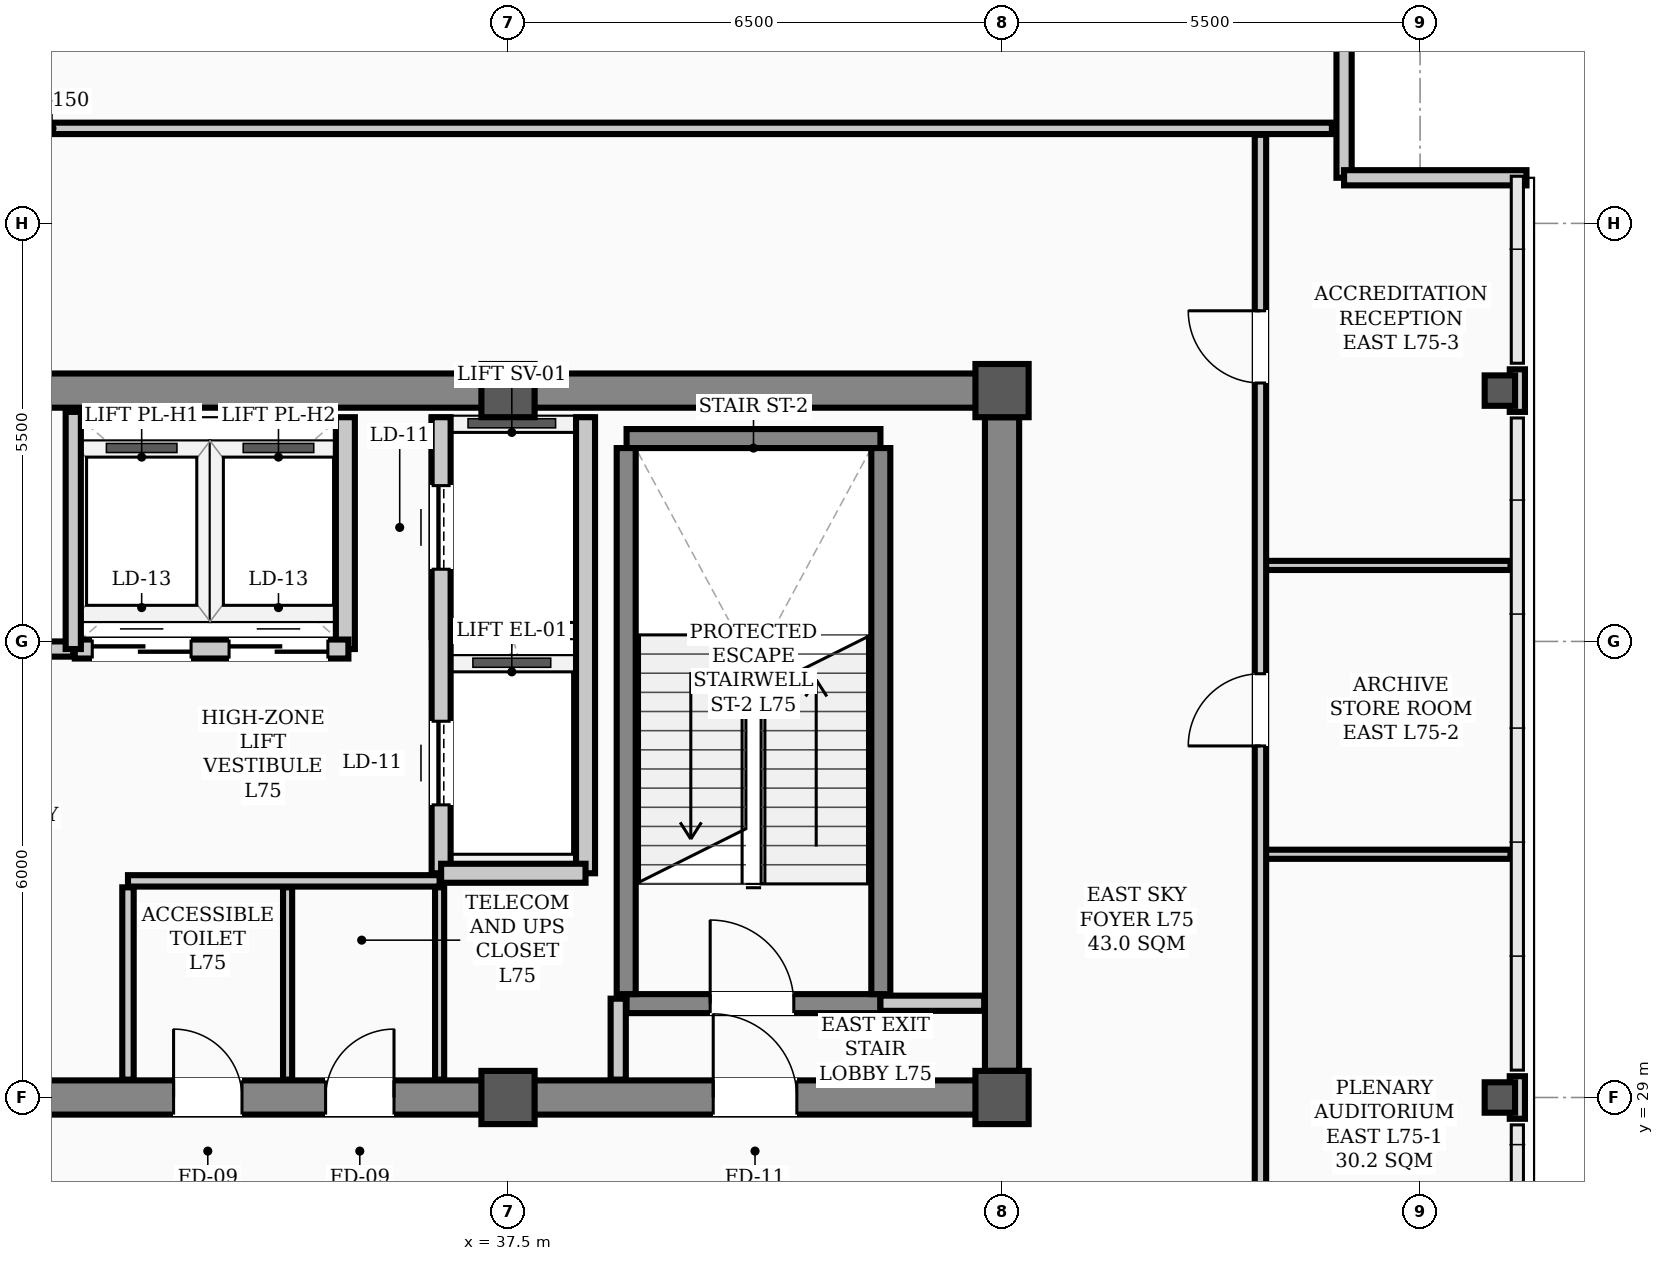
"""IFC4 building model, lengths in metres.
Left out: names, types, materials, properties, quantities, classifications, styles, units other than length and angle.
Written with IfcOpenShell. Run it as: python <this file> out.ifc"""

import sys

from ifc_helpers import new_model, si_unit, direction, frame, frame_2d, origin, origin_2d, place, context, subcontext, project, spatial, rectangle, hollow_rectangle, extrude, element, fill, save


model = new_model("IFC4")
c1 = context("Model", 3, precision=1e-05, world=origin(), true_north=direction((0.0, 1.0)))
c2 = subcontext(c1, "Body", "Model", "MODEL_VIEW")
j1 = project(units=[si_unit("LENGTHUNIT", "METRE"), si_unit("PLANEANGLEUNIT", "RADIAN")], contexts=[c1])
p1 = place(None, origin())
s1 = spatial("IfcSite", under=j1, at=p1, CompositionType="ELEMENT")
p2 = place(p1, origin())
s2 = spatial("IfcBuilding", under=s1, at=p2, CompositionType="ELEMENT")
p3 = place(p2, frame((0.0, 0.0, 300.8)))
s3 = spatial("IfcBuildingStorey", under=s2, at=p3, CompositionType="ELEMENT", Elevation=300.8)
for number, where, z_axis, x_axis in (
    (1, (37.5, 29.0, 0.0), (0.0, 0.0, 1.0), (1.0, 0.0, 0.0)),
    (2, (37.5, 38.3, 0.0), (0.0, 0.0, 1.0), (1.0, 0.0, 0.0)),
    (3, (44.0, 29.0, 0.0), (0.0, 0.0, 1.0), (1.0, 0.0, 0.0)),
    (4, (44.0, 38.3, 0.0), (0.0, 0.0, 1.0), (1.0, 0.0, 0.0)),
):
    element("IfcColumn", number, at=place(p3, frame(where, z_axis=z_axis, x_axis=x_axis)), inside=s3, PredefinedType="COLUMN", context=c2, shape_type="SweptSolid", body=[
        extrude(hollow_rectangle(XDim=0.7, YDim=0.7, WallThickness=0.028, InnerFilletRadius=0.014, OuterFilletRadius=0.042, at=origin_2d()), origin(), (0.0, 0.0, 1.0), 5.2),
    ])
for number, where, z_axis, x_axis in (
    (5, (50.55, 29.0, 0.0), (0.0, 0.0, 1.0), (1.0, 0.0, 0.0)),
    (6, (50.55, 38.3, 0.0), (0.0, 0.0, 1.0), (1.0, 0.0, 0.0)),
):
    element("IfcColumn", number, at=place(p3, frame(where, z_axis=z_axis, x_axis=x_axis)), inside=s3, PredefinedType="COLUMN", context=c2, shape_type="SweptSolid", body=[
        extrude(hollow_rectangle(XDim=0.4, YDim=0.4, WallThickness=0.02, InnerFilletRadius=0.02, OuterFilletRadius=0.04, at=origin_2d()), origin(), (0.0, 0.0, 1.0), 5.2),
    ])
for number, where, z_axis, x_axis in (
    (7, (50.78, 28.72, 0.0), (0.0, 0.0, 1.0), (0.0, 1.0, 0.0)),
    (8, (50.78, 38.02, 0.0), (0.0, 0.0, 1.0), (0.0, 1.0, 0.0)),
):
    element("IfcWall", number, at=place(p3, frame(where, z_axis=z_axis, x_axis=x_axis)), inside=s3, PredefinedType="PARAPET", context=c2, shape_type="SweptSolid", body=[
        extrude(rectangle(XDim=0.56, YDim=0.2, at=frame_2d((0.28, 0.0))), origin(), (0.0, 0.0, 1.0), 1.2),
    ])
for number, where, z_axis, x_axis in (
    (9, (48.5, 43.5, 0.0), (0.0, 0.0, 1.0), (0.0, -1.0, 0.0)),
    (10, (48.5, 41.1, 0.0), (0.0, 0.0, 1.0), (1.0, 0.0, 0.0)),
):
    element("IfcWall", number, at=place(p3, frame(where, z_axis=z_axis, x_axis=x_axis)), inside=s3, PredefinedType="PARAPET", context=c2, shape_type="SweptSolid", body=[
        extrude(rectangle(XDim=2.4, YDim=0.2, at=frame_2d((1.2, 0.0))), origin(), (0.0, 0.0, 1.0), 1.2),
    ])
p4 = place(p3, frame((13.5, 29.0, 0.0), z_axis=(0.0, 0.0, 1.0), x_axis=(1.0, 0.0, 0.0)))
e11 = element("IfcWall", 11, at=p4, inside=s3, PredefinedType="SHEAR", context=c2, shape_type="SweptSolid", body=[
    extrude(rectangle(XDim=30.5, YDim=0.45, at=frame_2d((15.25, 0.0))), origin(), (0.0, 0.0, 1.0), 4.9),
])
p5 = place(p4, frame((1.75, 0.0, 0.0)))
e12 = element("IfcOpeningElement", 12, at=p5, cuts=e11, PredefinedType="OPENING", context=c2, shape_type="SweptSolid", body=[
    extrude(rectangle(XDim=1.1, YDim=2.08, at=frame_2d((0.55, 1.04))), frame((0.0, 0.235, 0.0), z_axis=(0.0, -1.0, 0.0), x_axis=(1.0, 0.0, 0.0)), (0.0, 0.0, 1.0), 0.47),
])
p6 = place(p4, frame((26.7, 0.0, 0.0)))
e13 = element("IfcOpeningElement", 13, at=p6, cuts=e11, PredefinedType="OPENING", context=c2, shape_type="SweptSolid", body=[
    extrude(rectangle(XDim=1.1, YDim=2.08, at=frame_2d((0.55, 1.04))), frame((0.0, 0.235, 0.0), z_axis=(0.0, -1.0, 0.0), x_axis=(1.0, 0.0, 0.0)), (0.0, 0.0, 1.0), 0.47),
])
p7 = place(p4, frame((6.8, 0.0, 0.0)))
e14 = element("IfcOpeningElement", 14, at=p7, cuts=e11, PredefinedType="OPENING", context=c2, shape_type="SweptSolid", body=[
    extrude(rectangle(XDim=1.1, YDim=2.08, at=frame_2d((0.55, 1.04))), frame((0.0, 0.235, 0.0), z_axis=(0.0, -1.0, 0.0), x_axis=(1.0, 0.0, 0.0)), (0.0, 0.0, 1.0), 0.47),
])
p8 = place(p4, frame((13.2, 0.0, 0.0)))
e15 = element("IfcOpeningElement", 15, at=p8, cuts=e11, PredefinedType="OPENING", context=c2, shape_type="SweptSolid", body=[
    extrude(rectangle(XDim=1.6, YDim=2.08, at=frame_2d((0.8, 1.04))), frame((0.0, 0.235, 0.0), z_axis=(0.0, -1.0, 0.0), x_axis=(1.0, 0.0, 0.0)), (0.0, 0.0, 1.0), 0.47),
])
p9 = place(p4, frame((19.6, 0.0, 0.0)))
e16 = element("IfcOpeningElement", 16, at=p9, cuts=e11, PredefinedType="OPENING", context=c2, shape_type="SweptSolid", body=[
    extrude(rectangle(XDim=0.9, YDim=2.08, at=frame_2d((0.45, 1.04))), frame((0.0, 0.235, 0.0), z_axis=(0.0, -1.0, 0.0), x_axis=(1.0, 0.0, 0.0)), (0.0, 0.0, 1.0), 0.47),
])
p10 = place(p4, frame((21.6, 0.0, 0.0)))
e17 = element("IfcOpeningElement", 17, at=p10, cuts=e11, PredefinedType="OPENING", context=c2, shape_type="SweptSolid", body=[
    extrude(rectangle(XDim=0.9, YDim=2.08, at=frame_2d((0.45, 1.04))), frame((0.0, 0.235, 0.0), z_axis=(0.0, -1.0, 0.0), x_axis=(1.0, 0.0, 0.0)), (0.0, 0.0, 1.0), 0.47),
])
p11 = place(p3, frame((13.5, 38.3, 0.0), z_axis=(0.0, 0.0, 1.0), x_axis=(1.0, 0.0, 0.0)))
e18 = element("IfcWall", 18, at=p11, inside=s3, PredefinedType="SHEAR", context=c2, shape_type="SweptSolid", body=[
    extrude(rectangle(XDim=30.5, YDim=0.45, at=frame_2d((15.25, 0.0))), origin(), (0.0, 0.0, 1.0), 4.9),
])
p12 = place(p3, frame((44.0, 29.35, 0.0), z_axis=(0.0, 0.0, 1.0), x_axis=(0.0, 1.0, 0.0)))
e19 = element("IfcWall", 19, at=p12, inside=s3, PredefinedType="SHEAR", context=c2, shape_type="SweptSolid", body=[
    extrude(rectangle(XDim=8.6, YDim=0.45, at=frame_2d((4.3, 0.0))), origin(), (0.0, 0.0, 1.0), 4.9),
])
p13 = place(p3, frame((39.06, 30.235, 0.0), z_axis=(0.0, 0.0, 1.0), x_axis=(1.0, 0.0, 0.0)))
e20 = element("IfcWall", 20, at=p13, inside=s3, PredefinedType="STANDARD", context=c2, shape_type="SweptSolid", body=[
    extrude(rectangle(XDim=3.34, YDim=0.25, at=frame_2d((1.67, 0.0))), origin(), (0.0, 0.0, 1.0), 4.9),
])
p14 = place(p13, frame((1.1, 0.0, 0.0)))
e21 = element("IfcOpeningElement", 21, at=p14, cuts=e20, PredefinedType="OPENING", context=c2, shape_type="SweptSolid", body=[
    extrude(rectangle(XDim=1.1, YDim=2.08, at=frame_2d((0.55, 1.04))), frame((0.0, 0.135, 0.0), z_axis=(0.0, -1.0, 0.0), x_axis=(1.0, 0.0, 0.0)), (0.0, 0.0, 1.0), 0.27),
])
p15 = place(p3, frame((39.06, 37.669, 0.0), z_axis=(0.0, 0.0, 1.0), x_axis=(1.0, 0.0, 0.0)))
e22 = element("IfcWall", 22, at=p15, inside=s3, PredefinedType="STANDARD", context=c2, shape_type="SweptSolid", body=[
    extrude(rectangle(XDim=3.34, YDim=0.25, at=frame_2d((1.67, 0.0))), origin(), (0.0, 0.0, 1.0), 4.9),
])
for number, where, z_axis, x_axis in (
    (23, (39.055, 30.36, 0.0), (0.0, 0.0, 1.0), (0.0, 1.0, 0.0)),
    (24, (42.405, 30.36, 0.0), (0.0, 0.0, 1.0), (0.0, 1.0, 0.0)),
):
    element("IfcWall", number, at=place(p3, frame(where, z_axis=z_axis, x_axis=x_axis)), inside=s3, PredefinedType="STANDARD", context=c2, shape_type="SweptSolid", body=[
        extrude(rectangle(XDim=7.184, YDim=0.25, at=frame_2d((3.592, 0.0))), origin(), (0.0, 0.0, 1.0), 4.9),
    ])
p16 = place(p3, frame((36.62, 31.95, 0.0), z_axis=(0.0, 0.0, 1.0), x_axis=(0.0, 1.0, 0.0)))
e25 = element("IfcWall", 25, at=p16, inside=s3, PredefinedType="STANDARD", context=c2, shape_type="SweptSolid", body=[
    extrude(rectangle(XDim=6.0, YDim=0.25, at=frame_2d((3.0, 0.0))), origin(), (0.0, 0.0, 1.0), 3.48),
])
p17 = place(p16, frame((0.9, 0.0, 0.0)))
e26 = element("IfcOpeningElement", 26, at=p17, cuts=e25, PredefinedType="OPENING", context=c2, shape_type="SweptSolid", body=[
    extrude(rectangle(XDim=1.1, YDim=2.08, at=frame_2d((0.55, 1.04))), frame((0.0, 0.135, 0.0), z_axis=(0.0, -1.0, 0.0), x_axis=(1.0, 0.0, 0.0)), (0.0, 0.0, 1.0), 0.27),
])
p18 = place(p16, frame((4.0, 0.0, 0.0)))
e27 = element("IfcOpeningElement", 27, at=p18, cuts=e25, PredefinedType="OPENING", context=c2, shape_type="SweptSolid", body=[
    extrude(rectangle(XDim=1.1, YDim=2.08, at=frame_2d((0.55, 1.04))), frame((0.0, 0.135, 0.0), z_axis=(0.0, -1.0, 0.0), x_axis=(1.0, 0.0, 0.0)), (0.0, 0.0, 1.0), 0.27),
])
p19 = place(p3, frame((38.52, 31.95, 0.0), z_axis=(0.0, 0.0, 1.0), x_axis=(0.0, 1.0, 0.0)))
e28 = element("IfcWall", 28, at=p19, inside=s3, PredefinedType="STANDARD", context=c2, shape_type="SweptSolid", body=[
    extrude(rectangle(XDim=6.0, YDim=0.25, at=frame_2d((3.0, 0.0))), origin(), (0.0, 0.0, 1.0), 3.48),
])
p20 = place(p3, frame((36.62, 31.95, 0.0), z_axis=(0.0, 0.0, 1.0), x_axis=(1.0, 0.0, 0.0)))
e29 = element("IfcWall", 29, at=p20, inside=s3, PredefinedType="STANDARD", context=c2, shape_type="SweptSolid", body=[
    extrude(rectangle(XDim=1.9, YDim=0.25, at=frame_2d((0.95, 0.0))), origin(), (0.0, 0.0, 1.0), 4.78),
])
p21 = place(p3, frame((35.36, 34.9, 0.0), z_axis=(0.0, 0.0, 1.0), x_axis=(0.0, 1.0, 0.0)))
e30 = element("IfcWall", 30, at=p21, inside=s3, PredefinedType="STANDARD", context=c2, shape_type="SweptSolid", body=[
    extrude(rectangle(XDim=3.05, YDim=0.25, at=frame_2d((1.525, 0.0))), origin(), (0.0, 0.0, 1.0), 3.48),
])
p22 = place(p3, frame((31.8, 34.9, 0.0), z_axis=(0.0, 0.0, 1.0), x_axis=(1.0, 0.0, 0.0)))
e31 = element("IfcWall", 31, at=p22, inside=s3, PredefinedType="STANDARD", context=c2, shape_type="SweptSolid", body=[
    extrude(rectangle(XDim=3.6, YDim=0.25, at=frame_2d((1.8, 0.0))), origin(), (0.0, 0.0, 1.0), 4.9),
])
p23 = place(p22, frame((0.23, 0.0, 0.0)))
e32 = element("IfcOpeningElement", 32, at=p23, cuts=e31, PredefinedType="OPENING", context=c2, shape_type="SweptSolid", body=[
    extrude(rectangle(XDim=1.3, YDim=2.08, at=frame_2d((0.65, 1.04))), frame((0.0, 0.135, 0.0), z_axis=(0.0, -1.0, 0.0), x_axis=(1.0, 0.0, 0.0)), (0.0, 0.0, 1.0), 0.27),
])
p24 = place(p22, frame((2.03, 0.0, 0.0)))
e33 = element("IfcOpeningElement", 33, at=p24, cuts=e31, PredefinedType="OPENING", context=c2, shape_type="SweptSolid", body=[
    extrude(rectangle(XDim=1.3, YDim=2.08, at=frame_2d((0.65, 1.04))), frame((0.0, 0.135, 0.0), z_axis=(0.0, -1.0, 0.0), x_axis=(1.0, 0.0, 0.0)), (0.0, 0.0, 1.0), 0.27),
])
p25 = place(p3, frame((42.4, 30.24, 0.0), z_axis=(0.0, 0.0, 1.0), x_axis=(1.0, 0.0, 0.0)))
e34 = element("IfcWall", 34, at=p25, inside=s3, PredefinedType="STANDARD", context=c2, shape_type="SweptSolid", body=[
    extrude(rectangle(XDim=1.365, YDim=0.2, at=frame_2d((0.683, 0.0))), origin(), (0.0, 0.0, 1.0), 3.48),
])
p26 = place(p3, frame((23.6, 34.9, 0.0), z_axis=(0.0, 0.0, 1.0), x_axis=(1.0, 0.0, 0.0)))
e35 = element("IfcWall", 35, at=p26, inside=s3, PredefinedType="STANDARD", context=c2, shape_type="SweptSolid", body=[
    extrude(rectangle(XDim=8.18, YDim=0.2, at=frame_2d((4.09, 0.0))), origin(), (0.0, 0.0, 1.0), 4.9),
])
p27 = place(p26, frame((3.45, 0.0, 0.0)))
e36 = element("IfcOpeningElement", 36, at=p27, cuts=e35, PredefinedType="OPENING", context=c2, shape_type="SweptSolid", body=[
    extrude(rectangle(XDim=1.1, YDim=2.08, at=frame_2d((0.55, 1.04))), frame((0.0, 0.11, 0.0), z_axis=(0.0, -1.0, 0.0), x_axis=(1.0, 0.0, 0.0)), (0.0, 0.0, 1.0), 0.22),
])
p28 = place(p3, frame((32.5, 31.85, 0.0), z_axis=(0.0, 0.0, 1.0), x_axis=(1.0, 0.0, 0.0)))
e37 = element("IfcWall", 37, at=p28, inside=s3, PredefinedType="PARTITIONING", context=c2, shape_type="SweptSolid", body=[
    extrude(rectangle(XDim=4.1, YDim=0.15, at=frame_2d((2.05, 0.0))), origin(), (0.0, 0.0, 1.0), 4.9),
])
for number, where, z_axis, x_axis in (
    (38, (47.4, 32.2, 0.0), (0.0, 0.0, 1.0), (1.0, 0.0, 0.0)),
    (39, (47.4, 36.0, 0.0), (0.0, 0.0, 1.0), (1.0, 0.0, 0.0)),
):
    element("IfcWall", number, at=place(p3, frame(where, z_axis=z_axis, x_axis=x_axis)), inside=s3, PredefinedType="PARTITIONING", context=c2, shape_type="SweptSolid", body=[
        extrude(rectangle(XDim=3.29, YDim=0.12, at=frame_2d((1.645, 0.0))), origin(), (0.0, 0.0, 1.0), 3.48),
    ])
p29 = place(p3, frame((14.66, 41.75, 0.0), z_axis=(0.0, 0.0, 1.0), x_axis=(1.0, 0.0, 0.0)))
e40 = element("IfcWall", 40, at=p29, inside=s3, PredefinedType="PARTITIONING", context=c2, shape_type="SweptSolid", body=[
    extrude(rectangle(XDim=33.68, YDim=0.15, at=frame_2d((16.84, 0.0))), origin(), (0.0, 0.0, 1.0), 3.48),
])
p30 = place(p3, frame((38.95, 29.235, 0.0), z_axis=(0.0, 0.0, 1.0), x_axis=(0.0, 1.0, 0.0)))
e41 = element("IfcWall", 41, at=p30, inside=s3, PredefinedType="STANDARD", context=c2, shape_type="SweptSolid", body=[
    extrude(rectangle(XDim=1.065, YDim=0.2, at=frame_2d((0.532, 0.0))), origin(), (0.0, 0.0, 1.0), 3.48),
])
p31 = place(p3, frame((32.5, 29.235, 0.0), z_axis=(0.0, 0.0, 1.0), x_axis=(0.0, 1.0, 0.0)))
e42 = element("IfcWall", 42, at=p31, inside=s3, PredefinedType="PARTITIONING", context=c2, shape_type="SweptSolid", body=[
    extrude(rectangle(XDim=2.53, YDim=0.15, at=frame_2d((1.265, 0.0))), origin(), (0.0, 0.0, 1.0), 3.48),
])
for number, where, z_axis, x_axis in (
    (43, (36.6, 29.235, 0.0), (0.0, 0.0, 1.0), (0.0, 1.0, 0.0)),
    (44, (34.6, 29.235, 0.0), (0.0, 0.0, 1.0), (0.0, 1.0, 0.0)),
):
    element("IfcWall", number, at=place(p3, frame(where, z_axis=z_axis, x_axis=x_axis)), inside=s3, PredefinedType="PARTITIONING", context=c2, shape_type="SweptSolid", body=[
        extrude(rectangle(XDim=2.53, YDim=0.12, at=frame_2d((1.265, 0.0))), origin(), (0.0, 0.0, 1.0), 3.48),
    ])
p32 = place(p3, frame((47.4, 23.035, 0.0), z_axis=(0.0, 0.0, 1.0), x_axis=(0.0, 1.0, 0.0)))
e45 = element("IfcWall", 45, at=p32, inside=s3, PredefinedType="PARTITIONING", context=c2, shape_type="SweptSolid", body=[
    extrude(rectangle(XDim=18.63, YDim=0.15, at=frame_2d((9.315, 0.0))), origin(), (0.0, 0.0, 1.0), 3.48),
])
p33 = place(p32, frame((0.64, 0.0, 0.0)))
e46 = element("IfcOpeningElement", 46, at=p33, cuts=e45, PredefinedType="OPENING", context=c2, shape_type="SweptSolid", body=[
    extrude(rectangle(XDim=0.95, YDim=2.08, at=frame_2d((0.475, 1.04))), frame((0.0, 0.085, 0.0), z_axis=(0.0, -1.0, 0.0), x_axis=(1.0, 0.0, 0.0)), (0.0, 0.0, 1.0), 0.17),
])
p34 = place(p32, frame((10.59, 0.0, 0.0)))
e47 = element("IfcOpeningElement", 47, at=p34, cuts=e45, PredefinedType="OPENING", context=c2, shape_type="SweptSolid", body=[
    extrude(rectangle(XDim=0.95, YDim=2.08, at=frame_2d((0.475, 1.04))), frame((0.0, 0.085, 0.0), z_axis=(0.0, -1.0, 0.0), x_axis=(1.0, 0.0, 0.0)), (0.0, 0.0, 1.0), 0.17),
])
p35 = place(p32, frame((15.365, 0.0, 0.0)))
e48 = element("IfcOpeningElement", 48, at=p35, cuts=e45, PredefinedType="OPENING", context=c2, shape_type="SweptSolid", body=[
    extrude(rectangle(XDim=0.95, YDim=2.08, at=frame_2d((0.475, 1.04))), frame((0.0, 0.085, 0.0), z_axis=(0.0, -1.0, 0.0), x_axis=(1.0, 0.0, 0.0)), (0.0, 0.0, 1.0), 0.17),
])
p36 = place(p3, frame((31.78, 34.9, 0.0), z_axis=(0.0, 0.0, 1.0), x_axis=(0.0, 1.0, 0.0)))
e49 = element("IfcWall", 49, at=p36, inside=s3, PredefinedType="STANDARD", context=c2, shape_type="SweptSolid", body=[
    extrude(rectangle(XDim=3.12, YDim=0.2, at=frame_2d((1.56, 0.0))), origin(), (0.0, 0.0, 1.0), 3.48),
])
p37 = place(p14, origin())
e50 = element("IfcDoor", 50, at=p37, inside=s3, OperationType="SINGLE_SWING_LEFT", PredefinedType="DOOR", context=c2, shape_type="SweptSolid", body=[
    extrude(rectangle(XDim=1.1, YDim=2.08, at=frame_2d((0.55, 1.04))), frame((0.0, 0.025, 0.0), z_axis=(0.0, -1.0, 0.0), x_axis=(1.0, 0.0, 0.0)), (0.0, 0.0, 1.0), 0.05),
])
fill(e21, e50)
p38 = place(p6, origin())
e51 = element("IfcDoor", 51, at=p38, inside=s3, OperationType="SINGLE_SWING_LEFT", PredefinedType="DOOR", context=c2, shape_type="SweptSolid", body=[
    extrude(rectangle(XDim=1.1, YDim=2.08, at=frame_2d((0.55, 1.04))), frame((0.0, 0.025, 0.0), z_axis=(0.0, -1.0, 0.0), x_axis=(1.0, 0.0, 0.0)), (0.0, 0.0, 1.0), 0.05),
])
fill(e13, e51)
p39 = place(p9, origin())
e52 = element("IfcDoor", 52, at=p39, inside=s3, OperationType="SINGLE_SWING_LEFT", PredefinedType="DOOR", context=c2, shape_type="SweptSolid", body=[
    extrude(rectangle(XDim=0.9, YDim=2.08, at=frame_2d((0.45, 1.04))), frame((0.0, 0.025, 0.0), z_axis=(0.0, -1.0, 0.0), x_axis=(1.0, 0.0, 0.0)), (0.0, 0.0, 1.0), 0.05),
])
fill(e16, e52)
p40 = place(p10, origin())
e53 = element("IfcDoor", 53, at=p40, inside=s3, OperationType="SINGLE_SWING_RIGHT", PredefinedType="DOOR", context=c2, shape_type="SweptSolid", body=[
    extrude(rectangle(XDim=0.9, YDim=2.08, at=frame_2d((0.45, 1.04))), frame((0.0, 0.025, 0.0), z_axis=(0.0, -1.0, 0.0), x_axis=(1.0, 0.0, 0.0)), (0.0, 0.0, 1.0), 0.05),
])
fill(e17, e53)
p41 = place(p34, origin())
e54 = element("IfcDoor", 54, at=p41, inside=s3, OperationType="SINGLE_SWING_LEFT", PredefinedType="DOOR", context=c2, shape_type="SweptSolid", body=[
    extrude(rectangle(XDim=0.95, YDim=2.08, at=frame_2d((0.475, 1.04))), frame((0.0, 0.025, 0.0), z_axis=(0.0, -1.0, 0.0), x_axis=(1.0, 0.0, 0.0)), (0.0, 0.0, 1.0), 0.05),
])
fill(e47, e54)
p42 = place(p35, origin())
e55 = element("IfcDoor", 55, at=p42, inside=s3, OperationType="SINGLE_SWING_RIGHT", PredefinedType="DOOR", context=c2, shape_type="SweptSolid", body=[
    extrude(rectangle(XDim=0.95, YDim=2.08, at=frame_2d((0.475, 1.04))), frame((0.0, 0.025, 0.0), z_axis=(0.0, -1.0, 0.0), x_axis=(1.0, 0.0, 0.0)), (0.0, 0.0, 1.0), 0.05),
])
fill(e48, e55)
p43 = place(p17, origin())
e56 = element("IfcDoor", 56, at=p43, inside=s3, OperationType="SLIDING_TO_LEFT", PredefinedType="DOOR", context=c2, shape_type="SweptSolid", body=[
    extrude(rectangle(XDim=1.1, YDim=2.08, at=frame_2d((0.55, 1.04))), frame((0.0, 0.025, 0.0), z_axis=(0.0, -1.0, 0.0), x_axis=(1.0, 0.0, 0.0)), (0.0, 0.0, 1.0), 0.05),
])
fill(e26, e56)
p44 = place(p18, origin())
e57 = element("IfcDoor", 57, at=p44, inside=s3, OperationType="SLIDING_TO_LEFT", PredefinedType="DOOR", context=c2, shape_type="SweptSolid", body=[
    extrude(rectangle(XDim=1.1, YDim=2.08, at=frame_2d((0.55, 1.04))), frame((0.0, 0.025, 0.0), z_axis=(0.0, -1.0, 0.0), x_axis=(1.0, 0.0, 0.0)), (0.0, 0.0, 1.0), 0.05),
])
fill(e27, e57)
p45 = place(p23, origin())
e58 = element("IfcDoor", 58, at=p45, inside=s3, OperationType="DOUBLE_DOOR_SLIDING", PredefinedType="DOOR", context=c2, shape_type="SweptSolid", body=[
    extrude(rectangle(XDim=1.3, YDim=2.08, at=frame_2d((0.65, 1.04))), frame((0.0, 0.025, 0.0), z_axis=(0.0, -1.0, 0.0), x_axis=(1.0, 0.0, 0.0)), (0.0, 0.0, 1.0), 0.05),
])
fill(e32, e58)
p46 = place(p24, origin())
e59 = element("IfcDoor", 59, at=p46, inside=s3, OperationType="DOUBLE_DOOR_SLIDING", PredefinedType="DOOR", context=c2, shape_type="SweptSolid", body=[
    extrude(rectangle(XDim=1.3, YDim=2.08, at=frame_2d((0.65, 1.04))), frame((0.0, 0.025, 0.0), z_axis=(0.0, -1.0, 0.0), x_axis=(1.0, 0.0, 0.0)), (0.0, 0.0, 1.0), 0.05),
])
fill(e33, e59)
save(model, sys.argv[1])
